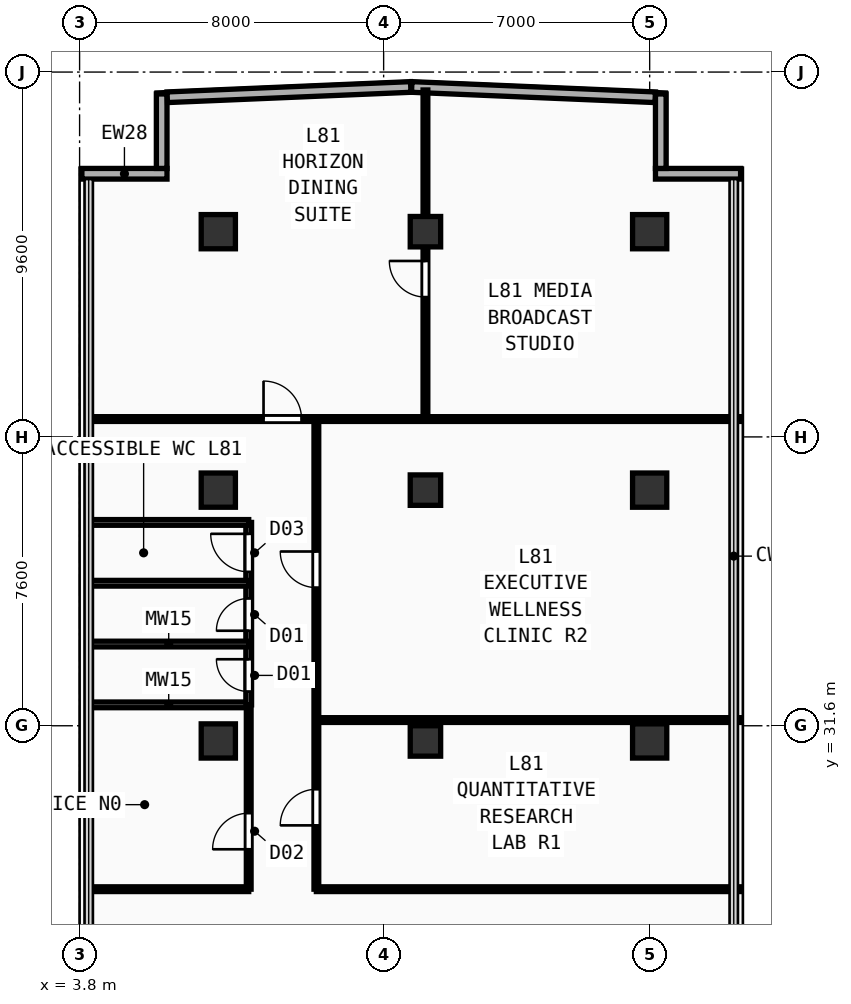
"""IFC4 building model, lengths in metres.
Left out: names, types, materials, properties, quantities, classifications, styles, units other than length and angle.
Written with IfcOpenShell. Run it as: python <this file> out.ifc"""

import sys

from ifc_helpers import new_model, si_unit, direction, frame, frame_2d, origin, origin_2d, place, context, subcontext, project, spatial, rectangle, extrude, element, fill, save


model = new_model("IFC4")
c1 = context("Model", 3, precision=1e-05, world=origin(), true_north=direction((0.0, 1.0)))
c2 = subcontext(c1, "Body", "Model", "MODEL_VIEW")
j1 = project(units=[si_unit("LENGTHUNIT", "METRE"), si_unit("PLANEANGLEUNIT", "RADIAN")], contexts=[c1])
p1 = place(None, origin())
s1 = spatial("IfcSite", under=j1, at=p1, CompositionType="ELEMENT")
p2 = place(p1, origin())
s2 = spatial("IfcBuilding", under=s1, at=p2, CompositionType="ELEMENT")
p3 = place(p2, frame((0.0, 0.0, 316.0)))
s3 = spatial("IfcBuildingStorey", under=s2, at=p3, CompositionType="ELEMENT", Elevation=316.0)
for number, where, z_axis, x_axis in (
    (1, (7.45, 31.2, 0.0), (0.0, 0.0, 1.0), (1.0, 0.0, 0.0)),
    (2, (7.45, 37.8, 0.0), (0.0, 0.0, 1.0), (1.0, 0.0, 0.0)),
    (3, (7.45, 44.6, 0.0), (0.0, 0.0, 1.0), (1.0, 0.0, 0.0)),
    (4, (18.8, 31.2, 0.0), (0.0, 0.0, 1.0), (1.0, 0.0, 0.0)),
    (5, (18.8, 37.8, 0.0), (0.0, 0.0, 1.0), (1.0, 0.0, 0.0)),
    (6, (18.8, 44.6, 0.0), (0.0, 0.0, 1.0), (1.0, 0.0, 0.0)),
):
    element("IfcColumn", number, at=place(p3, frame(where, z_axis=z_axis, x_axis=x_axis)), inside=s3, PredefinedType="COLUMN", context=c2, shape_type="SweptSolid", body=[
        extrude(rectangle(XDim=0.9, YDim=0.9, at=origin_2d()), origin(), (0.0, 0.0, 1.0), 3.56),
    ])
for number, where, z_axis, x_axis in (
    (7, (12.9, 31.2, 0.0), (0.0, 0.0, 1.0), (1.0, 0.0, 0.0)),
    (8, (12.9, 37.8, 0.0), (0.0, 0.0, 1.0), (1.0, 0.0, 0.0)),
    (9, (12.9, 44.6, 0.0), (0.0, 0.0, 1.0), (1.0, 0.0, 0.0)),
):
    element("IfcColumn", number, at=place(p3, frame(where, z_axis=z_axis, x_axis=x_axis)), inside=s3, PredefinedType="COLUMN", context=c2, shape_type="SweptSolid", body=[
        extrude(rectangle(XDim=0.8, YDim=0.8, at=origin_2d()), origin(), (0.0, 0.0, 1.0), 3.56),
    ])
p4 = place(p3, frame((18.953, 46.124, 0.0), z_axis=(0.0, 0.0, 1.0), x_axis=(1.0, 0.0, 0.0)))
e10 = element("IfcWall", 10, at=p4, inside=s3, PredefinedType="SOLIDWALL", context=c2, shape_type="SweptSolid", body=[
    extrude(rectangle(XDim=2.24, YDim=0.28, at=frame_2d((1.12, 0.0))), origin(), (0.0, 0.0, 1.0), 3.56),
])
p5 = place(p3, frame((19.093, 46.264, 0.0), z_axis=(0.0, 0.0, 1.0), x_axis=(0.0, 1.0, 0.0)))
e11 = element("IfcWall", 11, at=p5, inside=s3, PredefinedType="SOLIDWALL", context=c2, shape_type="SweptSolid", body=[
    extrude(rectangle(XDim=1.96, YDim=0.28, at=frame_2d((0.98, 0.0))), origin(), (0.0, 0.0, 1.0), 3.56),
])
p6 = place(p3, frame((3.86, 46.124, 0.0), z_axis=(0.0, 0.0, 1.0), x_axis=(1.0, 0.0, 0.0)))
e12 = element("IfcWall", 12, at=p6, inside=s3, PredefinedType="SOLIDWALL", context=c2, shape_type="SweptSolid", body=[
    extrude(rectangle(XDim=2.24, YDim=0.28, at=frame_2d((1.12, 0.0))), origin(), (0.0, 0.0, 1.0), 3.56),
])
p7 = place(p3, frame((5.96, 46.264, 0.0), z_axis=(0.0, 0.0, 1.0), x_axis=(0.0, 1.0, 0.0)))
e13 = element("IfcWall", 13, at=p7, inside=s3, PredefinedType="SOLIDWALL", context=c2, shape_type="SweptSolid", body=[
    extrude(rectangle(XDim=1.96, YDim=0.28, at=frame_2d((0.98, 0.0))), origin(), (0.0, 0.0, 1.0), 3.56),
])
p8 = place(p3, frame((18.946, 48.137, 0.0), z_axis=(0.0, 0.0, 1.0), x_axis=(-0.999108151586, 0.042224417519, 0.0)))
e14 = element("IfcWall", 14, at=p8, inside=s3, PredefinedType="SOLIDWALL", context=c2, shape_type="SweptSolid", body=[
    extrude(rectangle(XDim=6.412, YDim=0.28, at=frame_2d((3.206, 0.0))), origin(), (0.0, 0.0, 1.0), 3.56),
])
p9 = place(p3, frame((12.513, 48.408, 0.0), z_axis=(0.0, 0.0, 1.0), x_axis=(-0.999108219465, -0.042222811348, 0.0)))
e15 = element("IfcWall", 15, at=p9, inside=s3, PredefinedType="SOLIDWALL", context=c2, shape_type="SweptSolid", body=[
    extrude(rectangle(XDim=6.412, YDim=0.28, at=frame_2d((3.206, 0.0))), origin(), (0.0, 0.0, 1.0), 3.56),
])
p10 = place(p3, frame((8.25, 27.3, 0.0), z_axis=(0.0, 0.0, 1.0), x_axis=(0.0, 1.0, 0.0)))
e16 = element("IfcWall", 16, at=p10, inside=s3, PredefinedType="PARTITIONING", context=c2, shape_type="SweptSolid", body=[
    extrude(rectangle(XDim=4.85, YDim=0.125, at=frame_2d((2.425, 0.0))), origin(), (0.0, 0.0, 1.0), 3.56),
])
p11 = place(p10, frame((1.05, 0.0, 0.0)))
e17 = element("IfcOpeningElement", 17, at=p11, cuts=e16, PredefinedType="OPENING", context=c2, shape_type="SweptSolid", body=[
    extrude(rectangle(XDim=0.95, YDim=2.15, at=frame_2d((0.475, 1.075))), frame((0.0, 0.073, 0.0), z_axis=(0.0, -1.0, 0.0), x_axis=(1.0, 0.0, 0.0)), (0.0, 0.0, 1.0), 0.145),
])
p12 = place(p3, frame((4.04, 27.3, 0.0), z_axis=(0.0, 0.0, 1.0), x_axis=(1.0, 0.0, 0.0)))
e18 = element("IfcWall", 18, at=p12, inside=s3, PredefinedType="PARTITIONING", context=c2, shape_type="SweptSolid", body=[
    extrude(rectangle(XDim=4.21, YDim=0.125, at=frame_2d((2.105, 0.0))), origin(), (0.0, 0.0, 1.0), 3.56),
])
p13 = place(p3, frame((4.04, 32.15, 0.0), z_axis=(0.0, 0.0, 1.0), x_axis=(1.0, 0.0, 0.0)))
e19 = element("IfcWall", 19, at=p13, inside=s3, PredefinedType="PLUMBINGWALL", context=c2, shape_type="SweptSolid", body=[
    extrude(rectangle(XDim=4.21, YDim=0.15, at=frame_2d((2.105, 0.0))), origin(), (0.0, 0.0, 1.0), 3.56),
])
p14 = place(p3, frame((8.25, 32.15, 0.0), z_axis=(0.0, 0.0, 1.0), x_axis=(0.0, 1.0, 0.0)))
e20 = element("IfcWall", 20, at=p14, inside=s3, PredefinedType="PLUMBINGWALL", context=c2, shape_type="SweptSolid", body=[
    extrude(rectangle(XDim=4.8, YDim=0.15, at=frame_2d((2.4, 0.0))), origin(), (0.0, 0.0, 1.0), 3.56),
])
p15 = place(p14, frame((0.35, 0.0, 0.0)))
e21 = element("IfcOpeningElement", 21, at=p15, cuts=e20, PredefinedType="OPENING", context=c2, shape_type="SweptSolid", body=[
    extrude(rectangle(XDim=0.85, YDim=2.15, at=frame_2d((0.425, 1.075))), frame((0.0, 0.085, 0.0), z_axis=(0.0, -1.0, 0.0), x_axis=(1.0, 0.0, 0.0)), (0.0, 0.0, 1.0), 0.17),
])
p16 = place(p14, frame((1.95, 0.0, 0.0)))
e22 = element("IfcOpeningElement", 22, at=p16, cuts=e20, PredefinedType="OPENING", context=c2, shape_type="SweptSolid", body=[
    extrude(rectangle(XDim=0.85, YDim=2.15, at=frame_2d((0.425, 1.075))), frame((0.0, 0.085, 0.0), z_axis=(0.0, -1.0, 0.0), x_axis=(1.0, 0.0, 0.0)), (0.0, 0.0, 1.0), 0.17),
])
p17 = place(p14, frame((3.5, 0.0, 0.0)))
e23 = element("IfcOpeningElement", 23, at=p17, cuts=e20, PredefinedType="OPENING", context=c2, shape_type="SweptSolid", body=[
    extrude(rectangle(XDim=1.0, YDim=2.2, at=frame_2d((0.5, 1.1))), frame((0.0, 0.085, 0.0), z_axis=(0.0, -1.0, 0.0), x_axis=(1.0, 0.0, 0.0)), (0.0, 0.0, 1.0), 0.17),
])
for number, where, z_axis, x_axis in (
    (24, (4.04, 33.75, 0.0), (0.0, 0.0, 1.0), (1.0, 0.0, 0.0)),
    (25, (4.04, 35.35, 0.0), (0.0, 0.0, 1.0), (1.0, 0.0, 0.0)),
):
    element("IfcWall", number, at=place(p3, frame(where, z_axis=z_axis, x_axis=x_axis)), inside=s3, PredefinedType="PLUMBINGWALL", context=c2, shape_type="SweptSolid", body=[
        extrude(rectangle(XDim=4.21, YDim=0.15, at=frame_2d((2.105, 0.0))), origin(), (0.0, 0.0, 1.0), 3.26),
    ])
p18 = place(p3, frame((4.04, 36.95, 0.0), z_axis=(0.0, 0.0, 1.0), x_axis=(1.0, 0.0, 0.0)))
e26 = element("IfcWall", 26, at=p18, inside=s3, PredefinedType="PLUMBINGWALL", context=c2, shape_type="SweptSolid", body=[
    extrude(rectangle(XDim=4.21, YDim=0.15, at=frame_2d((2.105, 0.0))), origin(), (0.0, 0.0, 1.0), 3.56),
])
p19 = place(p3, frame((4.04, 39.67, 0.0), z_axis=(0.0, 0.0, 1.0), x_axis=(1.0, 0.0, 0.0)))
e27 = element("IfcWall", 27, at=p19, inside=s3, PredefinedType="PARTITIONING", context=c2, shape_type="SweptSolid", body=[
    extrude(rectangle(XDim=17.12, YDim=0.125, at=frame_2d((8.56, 0.0))), origin(), (0.0, 0.0, 1.0), 3.26),
])
p20 = place(p19, frame((4.6, 0.0, 0.0)))
e28 = element("IfcOpeningElement", 28, at=p20, cuts=e27, PredefinedType="OPENING", context=c2, shape_type="SweptSolid", body=[
    extrude(rectangle(XDim=1.0, YDim=2.2, at=frame_2d((0.5, 1.1))), frame((0.0, 0.073, 0.0), z_axis=(0.0, -1.0, 0.0), x_axis=(1.0, 0.0, 0.0)), (0.0, 0.0, 1.0), 0.145),
])
p21 = place(p3, frame((12.9, 39.67, 0.0), z_axis=(0.0, 0.0, 1.0), x_axis=(0.0, 1.0, 0.0)))
e29 = element("IfcWall", 29, at=p21, inside=s3, PredefinedType="PARTITIONING", context=c2, shape_type="SweptSolid", body=[
    extrude(rectangle(XDim=8.658, YDim=0.125, at=frame_2d((4.329, 0.0))), origin(), (0.0, 0.0, 1.0), 2.96),
])
p22 = place(p21, frame((3.209, 0.0, 0.0)))
e30 = element("IfcOpeningElement", 30, at=p22, cuts=e29, PredefinedType="OPENING", context=c2, shape_type="SweptSolid", body=[
    extrude(rectangle(XDim=0.95, YDim=2.15, at=frame_2d((0.475, 1.075))), frame((0.0, 0.073, 0.0), z_axis=(0.0, -1.0, 0.0), x_axis=(1.0, 0.0, 0.0)), (0.0, 0.0, 1.0), 0.145),
])
p23 = place(p3, frame((10.03, 27.3, 0.0), z_axis=(0.0, 0.0, 1.0), x_axis=(1.0, 0.0, 0.0)))
e31 = element("IfcWall", 31, at=p23, inside=s3, PredefinedType="PARTITIONING", context=c2, shape_type="SweptSolid", body=[
    extrude(rectangle(XDim=11.13, YDim=0.125, at=frame_2d((5.565, 0.0))), origin(), (0.0, 0.0, 1.0), 3.56),
])
p24 = place(p3, frame((10.03, 27.3, 0.0), z_axis=(0.0, 0.0, 1.0), x_axis=(0.0, 1.0, 0.0)))
e32 = element("IfcWall", 32, at=p24, inside=s3, PredefinedType="PARTITIONING", context=c2, shape_type="SweptSolid", body=[
    extrude(rectangle(XDim=12.37, YDim=0.125, at=frame_2d((6.185, 0.0))), origin(), (0.0, 0.0, 1.0), 3.56),
])
p25 = place(p24, frame((1.679, 0.0, 0.0)))
e33 = element("IfcOpeningElement", 33, at=p25, cuts=e32, PredefinedType="OPENING", context=c2, shape_type="SweptSolid", body=[
    extrude(rectangle(XDim=0.95, YDim=2.15, at=frame_2d((0.475, 1.075))), frame((0.0, 0.073, 0.0), z_axis=(0.0, -1.0, 0.0), x_axis=(1.0, 0.0, 0.0)), (0.0, 0.0, 1.0), 0.145),
])
p26 = place(p24, frame((7.935, 0.0, 0.0)))
e34 = element("IfcOpeningElement", 34, at=p26, cuts=e32, PredefinedType="OPENING", context=c2, shape_type="SweptSolid", body=[
    extrude(rectangle(XDim=0.95, YDim=2.15, at=frame_2d((0.475, 1.075))), frame((0.0, 0.073, 0.0), z_axis=(0.0, -1.0, 0.0), x_axis=(1.0, 0.0, 0.0)), (0.0, 0.0, 1.0), 0.145),
])
p27 = place(p3, frame((10.03, 31.75, 0.0), z_axis=(0.0, 0.0, 1.0), x_axis=(1.0, 0.0, 0.0)))
e35 = element("IfcWall", 35, at=p27, inside=s3, PredefinedType="PARTITIONING", context=c2, shape_type="SweptSolid", body=[
    extrude(rectangle(XDim=11.13, YDim=0.125, at=frame_2d((5.565, 0.0))), origin(), (0.0, 0.0, 1.0), 3.56),
])
p28 = place(p11, origin())
e36 = element("IfcDoor", 36, at=p28, inside=s3, OperationType="SINGLE_SWING_LEFT", PredefinedType="DOOR", context=c2, shape_type="SweptSolid", body=[
    extrude(rectangle(XDim=0.95, YDim=2.15, at=frame_2d((0.475, 1.075))), frame((0.0, 0.025, 0.0), z_axis=(0.0, -1.0, 0.0), x_axis=(1.0, 0.0, 0.0)), (0.0, 0.0, 1.0), 0.05),
])
fill(e17, e36)
p29 = place(p15, origin())
e37 = element("IfcDoor", 37, at=p29, inside=s3, OperationType="SINGLE_SWING_RIGHT", PredefinedType="DOOR", context=c2, shape_type="SweptSolid", body=[
    extrude(rectangle(XDim=0.85, YDim=2.15, at=frame_2d((0.425, 1.075))), frame((0.0, 0.025, 0.0), z_axis=(0.0, -1.0, 0.0), x_axis=(1.0, 0.0, 0.0)), (0.0, 0.0, 1.0), 0.05),
])
fill(e21, e37)
p30 = place(p16, origin())
e38 = element("IfcDoor", 38, at=p30, inside=s3, OperationType="SINGLE_SWING_LEFT", PredefinedType="DOOR", context=c2, shape_type="SweptSolid", body=[
    extrude(rectangle(XDim=0.85, YDim=2.15, at=frame_2d((0.425, 1.075))), frame((0.0, 0.025, 0.0), z_axis=(0.0, -1.0, 0.0), x_axis=(1.0, 0.0, 0.0)), (0.0, 0.0, 1.0), 0.05),
])
fill(e22, e38)
p31 = place(p17, origin())
e39 = element("IfcDoor", 39, at=p31, inside=s3, OperationType="SINGLE_SWING_RIGHT", PredefinedType="DOOR", context=c2, shape_type="SweptSolid", body=[
    extrude(rectangle(XDim=1.0, YDim=2.2, at=frame_2d((0.5, 1.1))), frame((0.0, 0.025, 0.0), z_axis=(0.0, -1.0, 0.0), x_axis=(1.0, 0.0, 0.0)), (0.0, 0.0, 1.0), 0.05),
])
fill(e23, e39)
p32 = place(p20, origin())
e40 = element("IfcDoor", 40, at=p32, inside=s3, OperationType="SINGLE_SWING_LEFT", PredefinedType="DOOR", context=c2, shape_type="SweptSolid", body=[
    extrude(rectangle(XDim=1.0, YDim=2.2, at=frame_2d((0.5, 1.1))), frame((0.0, 0.025, 0.0), z_axis=(0.0, -1.0, 0.0), x_axis=(1.0, 0.0, 0.0)), (0.0, 0.0, 1.0), 0.05),
])
fill(e28, e40)
p33 = place(p22, origin())
e41 = element("IfcDoor", 41, at=p33, inside=s3, OperationType="SINGLE_SWING_RIGHT", PredefinedType="DOOR", context=c2, shape_type="SweptSolid", body=[
    extrude(rectangle(XDim=0.95, YDim=2.15, at=frame_2d((0.475, 1.075))), frame((0.0, 0.025, 0.0), z_axis=(0.0, -1.0, 0.0), x_axis=(1.0, 0.0, 0.0)), (0.0, 0.0, 1.0), 0.05),
])
fill(e30, e41)
p34 = place(p25, origin())
e42 = element("IfcDoor", 42, at=p34, inside=s3, OperationType="SINGLE_SWING_LEFT", PredefinedType="DOOR", context=c2, shape_type="SweptSolid", body=[
    extrude(rectangle(XDim=0.95, YDim=2.15, at=frame_2d((0.475, 1.075))), frame((0.0, 0.025, 0.0), z_axis=(0.0, -1.0, 0.0), x_axis=(1.0, 0.0, 0.0)), (0.0, 0.0, 1.0), 0.05),
])
fill(e33, e42)
p35 = place(p26, origin())
e43 = element("IfcDoor", 43, at=p35, inside=s3, OperationType="SINGLE_SWING_RIGHT", PredefinedType="DOOR", context=c2, shape_type="SweptSolid", body=[
    extrude(rectangle(XDim=0.95, YDim=2.15, at=frame_2d((0.475, 1.075))), frame((0.0, 0.025, 0.0), z_axis=(0.0, -1.0, 0.0), x_axis=(1.0, 0.0, 0.0)), (0.0, 0.0, 1.0), 0.05),
])
fill(e34, e43)
save(model, sys.argv[1])
